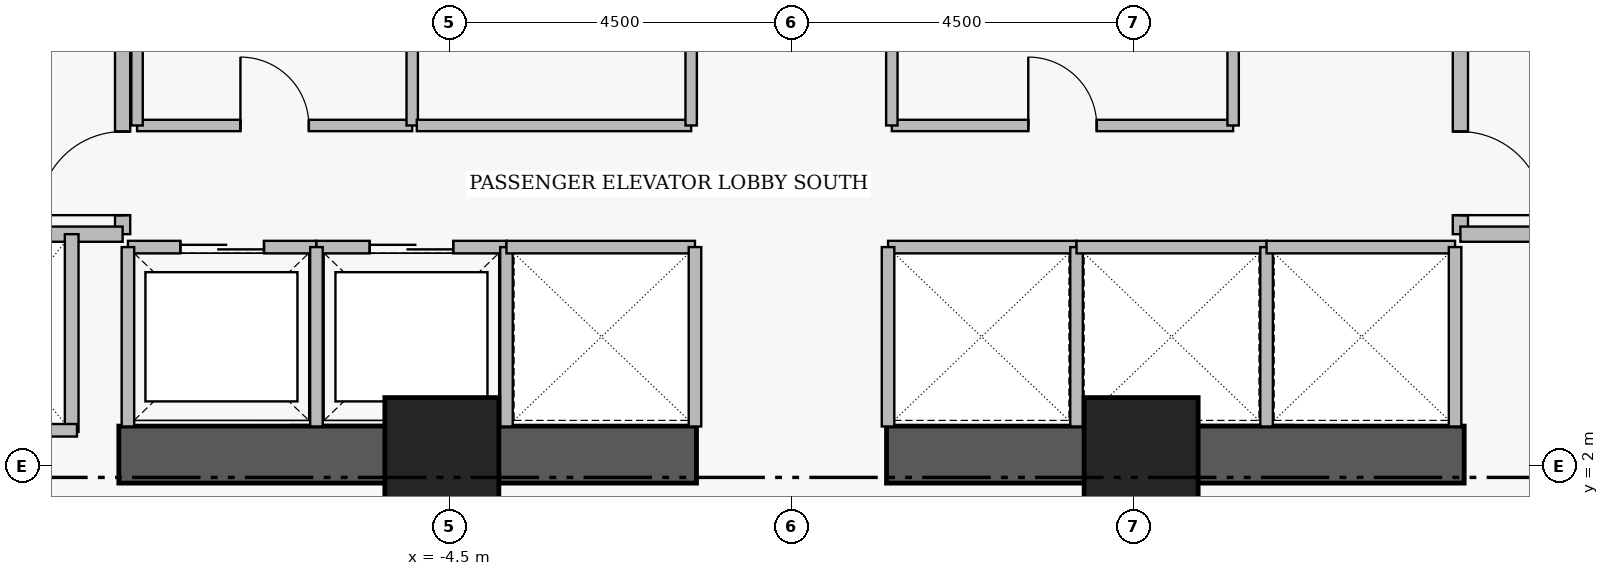
"""IFC4 building model, lengths in metres.
Left out: names, types, materials, properties, quantities, classifications, styles, units other than length and angle.
Written with IfcOpenShell. Run it as: python <this file> out.ifc"""

import sys

from ifc_helpers import new_model, si_unit, direction, frame, frame_2d, origin, origin_2d, place, context, subcontext, project, spatial, rectangle, extrude, element, fill, save


model = new_model("IFC4")
c1 = context("Model", 3, precision=1e-05, world=origin(), true_north=direction((0.0, 1.0)))
c2 = subcontext(c1, "Body", "Model", "MODEL_VIEW")
j1 = project(units=[si_unit("LENGTHUNIT", "METRE"), si_unit("PLANEANGLEUNIT", "RADIAN")], contexts=[c1])
p1 = place(None, origin())
s1 = spatial("IfcSite", under=j1, at=p1, CompositionType="ELEMENT")
p2 = place(p1, origin())
s2 = spatial("IfcBuilding", under=s1, at=p2, CompositionType="ELEMENT")
p3 = place(p2, frame((0.0, 0.0, 95.65)))
s3 = spatial("IfcBuildingStorey", under=s2, at=p3, CompositionType="ELEMENT", Elevation=95.65)
for number, where, z_axis, x_axis in (
    (1, (-8.85, 2.15, 0.0), (0.0, 0.0, 1.0), (1.0, 0.0, 0.0)),
    (2, (1.25, 2.15, 0.0), (0.0, 0.0, 1.0), (1.0, 0.0, 0.0)),
):
    element("IfcWall", number, at=place(p3, frame(where, z_axis=z_axis, x_axis=x_axis)), inside=s3, PredefinedType="SHEAR", context=c2, shape_type="SweptSolid", body=[
        extrude(rectangle(XDim=7.6, YDim=0.75, at=frame_2d((3.8, 0.0))), origin(), (0.0, 0.0, 1.0), 3.43),
    ])
for number, where, z_axis, x_axis in (
    (3, (-4.6, 2.15, 0.0), (0.0, 0.0, 1.0), (1.0, 0.0, 0.0)),
    (4, (4.6, 2.15, 0.0), (0.0, 0.0, 1.0), (1.0, 0.0, 0.0)),
):
    element("IfcColumn", number, at=place(p3, frame(where, z_axis=z_axis, x_axis=x_axis)), inside=s3, PredefinedType="COLUMN", context=c2, shape_type="SweptSolid", body=[
        extrude(rectangle(XDim=1.5, YDim=1.5, at=origin_2d()), origin(), (0.0, 0.0, 1.0), 3.65),
    ])
p4 = place(p3, frame((-8.8, 5.05, 0.0), z_axis=(0.0, 0.0, 1.0), x_axis=(0.0, 1.0, 0.0)))
e5 = element("IfcWall", 5, at=p4, inside=s3, PredefinedType="PARTITIONING", context=c2, shape_type="SweptSolid", body=[
    extrude(rectangle(XDim=6.1, YDim=0.2, at=frame_2d((3.05, 0.0))), origin(), (0.0, 0.0, 1.0), 3.43),
])
p5 = place(p4, frame((0.25, 0.0, 0.0)))
e6 = element("IfcOpeningElement", 6, at=p5, cuts=e5, PredefinedType="OPENING", context=c2, shape_type="SweptSolid", body=[
    extrude(rectangle(XDim=1.1, YDim=2.2, at=frame_2d((0.55, 1.1))), frame((0.0, 0.11, 0.0), z_axis=(0.0, -1.0, 0.0), x_axis=(1.0, 0.0, 0.0)), (0.0, 0.0, 1.0), 0.22),
])
p6 = place(p4, frame((3.85, 0.0, 0.0)))
e7 = element("IfcOpeningElement", 7, at=p6, cuts=e5, PredefinedType="OPENING", context=c2, shape_type="SweptSolid", body=[
    extrude(rectangle(XDim=1.1, YDim=2.2, at=frame_2d((0.55, 1.1))), frame((0.0, 0.11, 0.0), z_axis=(0.0, -1.0, 0.0), x_axis=(1.0, 0.0, 0.0)), (0.0, 0.0, 1.0), 0.22),
])
p7 = place(p3, frame((8.8, 11.15, 0.0), z_axis=(0.0, 0.0, 1.0), x_axis=(0.0, -1.0, 0.0)))
e8 = element("IfcWall", 8, at=p7, inside=s3, PredefinedType="PARTITIONING", context=c2, shape_type="SweptSolid", body=[
    extrude(rectangle(XDim=6.1, YDim=0.2, at=frame_2d((3.05, 0.0))), origin(), (0.0, 0.0, 1.0), 3.43),
])
p8 = place(p7, frame((1.15, 0.0, 0.0)))
e9 = element("IfcOpeningElement", 9, at=p8, cuts=e8, PredefinedType="OPENING", context=c2, shape_type="SweptSolid", body=[
    extrude(rectangle(XDim=1.1, YDim=2.2, at=frame_2d((0.55, 1.1))), frame((0.0, 0.11, 0.0), z_axis=(0.0, -1.0, 0.0), x_axis=(1.0, 0.0, 0.0)), (0.0, 0.0, 1.0), 0.22),
])
p9 = place(p7, frame((4.75, 0.0, 0.0)))
e10 = element("IfcOpeningElement", 10, at=p9, cuts=e8, PredefinedType="OPENING", context=c2, shape_type="SweptSolid", body=[
    extrude(rectangle(XDim=1.1, YDim=2.2, at=frame_2d((0.55, 1.1))), frame((0.0, 0.11, 0.0), z_axis=(0.0, -1.0, 0.0), x_axis=(1.0, 0.0, 0.0)), (0.0, 0.0, 1.0), 0.22),
])
p10 = place(p3, frame((-8.73, 4.88, 0.0), z_axis=(0.0, 0.0, 1.0), x_axis=(1.0, 0.0, 0.0)))
e11 = element("IfcWall", 11, at=p10, inside=s3, PredefinedType="PARTITIONING", context=c2, shape_type="SweptSolid", body=[
    extrude(rectangle(XDim=2.48, YDim=0.165, at=frame_2d((1.24, 0.0))), origin(), (0.0, 0.0, 1.0), 3.43),
])
p11 = place(p10, frame((0.69, 0.0, 0.0)))
e12 = element("IfcOpeningElement", 12, at=p11, cuts=e11, PredefinedType="OPENING", context=c2, shape_type="SweptSolid", body=[
    extrude(rectangle(XDim=1.1, YDim=2.25, at=frame_2d((0.55, 1.125))), frame((0.0, 0.093, 0.0), z_axis=(0.0, -1.0, 0.0), x_axis=(1.0, 0.0, 0.0)), (0.0, 0.0, 1.0), 0.185),
])
p12 = place(p3, frame((-6.25, 4.88, 0.0), z_axis=(0.0, 0.0, 1.0), x_axis=(1.0, 0.0, 0.0)))
e13 = element("IfcWall", 13, at=p12, inside=s3, PredefinedType="PARTITIONING", context=c2, shape_type="SweptSolid", body=[
    extrude(rectangle(XDim=2.5, YDim=0.165, at=frame_2d((1.25, 0.0))), origin(), (0.0, 0.0, 1.0), 3.43),
])
p13 = place(p12, frame((0.7, 0.0, 0.0)))
e14 = element("IfcOpeningElement", 14, at=p13, cuts=e13, PredefinedType="OPENING", context=c2, shape_type="SweptSolid", body=[
    extrude(rectangle(XDim=1.1, YDim=2.25, at=frame_2d((0.55, 1.125))), frame((0.0, 0.093, 0.0), z_axis=(0.0, -1.0, 0.0), x_axis=(1.0, 0.0, 0.0)), (0.0, 0.0, 1.0), 0.185),
])
p14 = place(p3, frame((-8.61, 6.48, 0.0), z_axis=(0.0, 0.0, 1.0), x_axis=(1.0, 0.0, 0.0)))
e15 = element("IfcWall", 15, at=p14, inside=s3, PredefinedType="PARTITIONING", context=c2, shape_type="SweptSolid", body=[
    extrude(rectangle(XDim=3.62, YDim=0.15, at=frame_2d((1.81, 0.0))), origin(), (0.0, 0.0, 1.0), 3.43),
])
p15 = place(p14, frame((1.36, 0.0, 0.0)))
e16 = element("IfcOpeningElement", 16, at=p15, cuts=e15, PredefinedType="OPENING", context=c2, shape_type="SweptSolid", body=[
    extrude(rectangle(XDim=0.9, YDim=2.15, at=frame_2d((0.45, 1.075))), frame((0.0, 0.085, 0.0), z_axis=(0.0, -1.0, 0.0), x_axis=(1.0, 0.0, 0.0)), (0.0, 0.0, 1.0), 0.17),
])
p16 = place(p3, frame((1.32, 6.48, 0.0), z_axis=(0.0, 0.0, 1.0), x_axis=(1.0, 0.0, 0.0)))
e17 = element("IfcWall", 17, at=p16, inside=s3, PredefinedType="PARTITIONING", context=c2, shape_type="SweptSolid", body=[
    extrude(rectangle(XDim=4.49, YDim=0.15, at=frame_2d((2.245, 0.0))), origin(), (0.0, 0.0, 1.0), 3.43),
])
p17 = place(p16, frame((1.795, 0.0, 0.0)))
e18 = element("IfcOpeningElement", 18, at=p17, cuts=e17, PredefinedType="OPENING", context=c2, shape_type="SweptSolid", body=[
    extrude(rectangle(XDim=0.9, YDim=2.15, at=frame_2d((0.45, 1.075))), frame((0.0, 0.085, 0.0), z_axis=(0.0, -1.0, 0.0), x_axis=(1.0, 0.0, 0.0)), (0.0, 0.0, 1.0), 0.17),
])
for number, where, z_axis, x_axis in (
    (19, (-11.65, 5.05, 0.0), (0.0, 0.0, 1.0), (1.0, 0.0, 0.0)),
    (20, (8.8, 5.05, 0.0), (0.0, 0.0, 1.0), (1.0, 0.0, 0.0)),
):
    element("IfcWall", number, at=place(p3, frame(where, z_axis=z_axis, x_axis=x_axis)), inside=s3, PredefinedType="PARTITIONING", context=c2, shape_type="SweptSolid", body=[
        extrude(rectangle(XDim=2.85, YDim=0.2, at=frame_2d((1.425, 0.0))), origin(), (0.0, 0.0, 1.0), 3.43),
    ])
for number, where, z_axis, x_axis in (
    (21, (-8.73, 2.52, 0.0), (0.0, 0.0, 1.0), (0.0, 1.0, 0.0)),
    (22, (-6.25, 2.52, 0.0), (0.0, 0.0, 1.0), (0.0, 1.0, 0.0)),
    (23, (-3.75, 2.52, 0.0), (0.0, 0.0, 1.0), (0.0, 1.0, 0.0)),
):
    element("IfcWall", number, at=place(p3, frame(where, z_axis=z_axis, x_axis=x_axis)), inside=s3, PredefinedType="PARTITIONING", context=c2, shape_type="SweptSolid", body=[
        extrude(rectangle(XDim=2.36, YDim=0.165, at=frame_2d((1.18, 0.0))), origin(), (0.0, 0.0, 1.0), 3.43),
    ])
p18 = place(p3, frame((-3.75, 4.88, 0.0), z_axis=(0.0, 0.0, 1.0), x_axis=(1.0, 0.0, 0.0)))
e24 = element("IfcWall", 24, at=p18, inside=s3, PredefinedType="PARTITIONING", context=c2, shape_type="SweptSolid", body=[
    extrude(rectangle(XDim=2.48, YDim=0.165, at=frame_2d((1.24, 0.0))), origin(), (0.0, 0.0, 1.0), 3.43),
])
p19 = place(p3, frame((-1.27, 2.52, 0.0), z_axis=(0.0, 0.0, 1.0), x_axis=(0.0, 1.0, 0.0)))
e25 = element("IfcWall", 25, at=p19, inside=s3, PredefinedType="PARTITIONING", context=c2, shape_type="SweptSolid", body=[
    extrude(rectangle(XDim=2.36, YDim=0.165, at=frame_2d((1.18, 0.0))), origin(), (0.0, 0.0, 1.0), 3.43),
])
p20 = place(p3, frame((1.27, 4.88, 0.0), z_axis=(0.0, 0.0, 1.0), x_axis=(1.0, 0.0, 0.0)))
e26 = element("IfcWall", 26, at=p20, inside=s3, PredefinedType="PARTITIONING", context=c2, shape_type="SweptSolid", body=[
    extrude(rectangle(XDim=2.48, YDim=0.165, at=frame_2d((1.24, 0.0))), origin(), (0.0, 0.0, 1.0), 3.43),
])
for number, where, z_axis, x_axis in (
    (27, (1.27, 2.52, 0.0), (0.0, 0.0, 1.0), (0.0, 1.0, 0.0)),
    (28, (3.75, 2.52, 0.0), (0.0, 0.0, 1.0), (0.0, 1.0, 0.0)),
):
    element("IfcWall", number, at=place(p3, frame(where, z_axis=z_axis, x_axis=x_axis)), inside=s3, PredefinedType="PARTITIONING", context=c2, shape_type="SweptSolid", body=[
        extrude(rectangle(XDim=2.36, YDim=0.165, at=frame_2d((1.18, 0.0))), origin(), (0.0, 0.0, 1.0), 3.43),
    ])
p21 = place(p3, frame((3.75, 4.88, 0.0), z_axis=(0.0, 0.0, 1.0), x_axis=(1.0, 0.0, 0.0)))
e29 = element("IfcWall", 29, at=p21, inside=s3, PredefinedType="PARTITIONING", context=c2, shape_type="SweptSolid", body=[
    extrude(rectangle(XDim=2.5, YDim=0.165, at=frame_2d((1.25, 0.0))), origin(), (0.0, 0.0, 1.0), 3.43),
])
p22 = place(p3, frame((6.25, 2.52, 0.0), z_axis=(0.0, 0.0, 1.0), x_axis=(0.0, 1.0, 0.0)))
e30 = element("IfcWall", 30, at=p22, inside=s3, PredefinedType="PARTITIONING", context=c2, shape_type="SweptSolid", body=[
    extrude(rectangle(XDim=2.36, YDim=0.165, at=frame_2d((1.18, 0.0))), origin(), (0.0, 0.0, 1.0), 3.43),
])
p23 = place(p3, frame((6.25, 4.88, 0.0), z_axis=(0.0, 0.0, 1.0), x_axis=(1.0, 0.0, 0.0)))
e31 = element("IfcWall", 31, at=p23, inside=s3, PredefinedType="PARTITIONING", context=c2, shape_type="SweptSolid", body=[
    extrude(rectangle(XDim=2.48, YDim=0.165, at=frame_2d((1.24, 0.0))), origin(), (0.0, 0.0, 1.0), 3.43),
])
p24 = place(p3, frame((8.73, 2.52, 0.0), z_axis=(0.0, 0.0, 1.0), x_axis=(0.0, 1.0, 0.0)))
e32 = element("IfcWall", 32, at=p24, inside=s3, PredefinedType="PARTITIONING", context=c2, shape_type="SweptSolid", body=[
    extrude(rectangle(XDim=2.36, YDim=0.165, at=frame_2d((1.18, 0.0))), origin(), (0.0, 0.0, 1.0), 3.43),
])
p25 = place(p3, frame((-9.47, 2.45, 0.0), z_axis=(0.0, 0.0, 1.0), x_axis=(0.0, 1.0, 0.0)))
e33 = element("IfcWall", 33, at=p25, inside=s3, PredefinedType="PARTITIONING", context=c2, shape_type="SweptSolid", body=[
    extrude(rectangle(XDim=2.6, YDim=0.18, at=frame_2d((1.3, 0.0))), origin(), (0.0, 0.0, 1.0), 3.43),
])
p26 = place(p3, frame((-11.71, 2.47, 0.0), z_axis=(0.0, 0.0, 1.0), x_axis=(1.0, 0.0, 0.0)))
e34 = element("IfcWall", 34, at=p26, inside=s3, PredefinedType="PARTITIONING", context=c2, shape_type="SweptSolid", body=[
    extrude(rectangle(XDim=2.31, YDim=0.165, at=frame_2d((1.155, 0.0))), origin(), (0.0, 0.0, 1.0), 2.03),
])
for number, where, z_axis, x_axis in (
    (35, (-8.61, 6.48, 0.0), (0.0, 0.0, 1.0), (0.0, 1.0, 0.0)),
    (36, (-4.99, 6.48, 0.0), (0.0, 0.0, 1.0), (0.0, 1.0, 0.0)),
):
    element("IfcWall", number, at=place(p3, frame(where, z_axis=z_axis, x_axis=x_axis)), inside=s3, PredefinedType="PARTITIONING", context=c2, shape_type="SweptSolid", body=[
        extrude(rectangle(XDim=2.24, YDim=0.15, at=frame_2d((1.12, 0.0))), origin(), (0.0, 0.0, 1.0), 3.43),
    ])
p27 = place(p3, frame((-4.93, 6.48, 0.0), z_axis=(0.0, 0.0, 1.0), x_axis=(1.0, 0.0, 0.0)))
e37 = element("IfcWall", 37, at=p27, inside=s3, PredefinedType="PARTITIONING", context=c2, shape_type="SweptSolid", body=[
    extrude(rectangle(XDim=3.61, YDim=0.15, at=frame_2d((1.805, 0.0))), origin(), (0.0, 0.0, 1.0), 3.43),
])
for number, where, z_axis, x_axis in (
    (38, (-1.32, 6.48, 0.0), (0.0, 0.0, 1.0), (0.0, 1.0, 0.0)),
    (39, (1.32, 6.48, 0.0), (0.0, 0.0, 1.0), (0.0, 1.0, 0.0)),
    (40, (5.81, 6.48, 0.0), (0.0, 0.0, 1.0), (0.0, 1.0, 0.0)),
):
    element("IfcWall", number, at=place(p3, frame(where, z_axis=z_axis, x_axis=x_axis)), inside=s3, PredefinedType="PARTITIONING", context=c2, shape_type="SweptSolid", body=[
        extrude(rectangle(XDim=2.24, YDim=0.15, at=frame_2d((1.12, 0.0))), origin(), (0.0, 0.0, 1.0), 3.43),
    ])
p28 = place(p5, origin())
e41 = element("IfcDoor", 41, at=p28, inside=s3, OperationType="SINGLE_SWING_LEFT", PredefinedType="DOOR", context=c2, shape_type="SweptSolid", body=[
    extrude(rectangle(XDim=1.1, YDim=2.2, at=frame_2d((0.55, 1.1))), frame((0.0, 0.025, 0.0), z_axis=(0.0, -1.0, 0.0), x_axis=(1.0, 0.0, 0.0)), (0.0, 0.0, 1.0), 0.05),
])
fill(e6, e41)
p29 = place(p9, origin())
e42 = element("IfcDoor", 42, at=p29, inside=s3, OperationType="SINGLE_SWING_RIGHT", PredefinedType="DOOR", context=c2, shape_type="SweptSolid", body=[
    extrude(rectangle(XDim=1.1, YDim=2.2, at=frame_2d((0.55, 1.1))), frame((0.0, 0.025, 0.0), z_axis=(0.0, -1.0, 0.0), x_axis=(1.0, 0.0, 0.0)), (0.0, 0.0, 1.0), 0.05),
])
fill(e10, e42)
p30 = place(p11, origin())
e43 = element("IfcDoor", 43, at=p30, inside=s3, OperationType="SLIDING_TO_LEFT", PredefinedType="DOOR", context=c2, shape_type="SweptSolid", body=[
    extrude(rectangle(XDim=1.1, YDim=2.25, at=frame_2d((0.55, 1.125))), frame((0.0, 0.025, 0.0), z_axis=(0.0, -1.0, 0.0), x_axis=(1.0, 0.0, 0.0)), (0.0, 0.0, 1.0), 0.05),
])
fill(e12, e43)
p31 = place(p13, origin())
e44 = element("IfcDoor", 44, at=p31, inside=s3, OperationType="SLIDING_TO_LEFT", PredefinedType="DOOR", context=c2, shape_type="SweptSolid", body=[
    extrude(rectangle(XDim=1.1, YDim=2.25, at=frame_2d((0.55, 1.125))), frame((0.0, 0.025, 0.0), z_axis=(0.0, -1.0, 0.0), x_axis=(1.0, 0.0, 0.0)), (0.0, 0.0, 1.0), 0.05),
])
fill(e14, e44)
p32 = place(p15, origin())
e45 = element("IfcDoor", 45, at=p32, inside=s3, OperationType="SINGLE_SWING_LEFT", PredefinedType="DOOR", context=c2, shape_type="SweptSolid", body=[
    extrude(rectangle(XDim=0.9, YDim=2.15, at=frame_2d((0.45, 1.075))), frame((0.0, 0.025, 0.0), z_axis=(0.0, -1.0, 0.0), x_axis=(1.0, 0.0, 0.0)), (0.0, 0.0, 1.0), 0.05),
])
fill(e16, e45)
p33 = place(p17, origin())
e46 = element("IfcDoor", 46, at=p33, inside=s3, OperationType="SINGLE_SWING_LEFT", PredefinedType="DOOR", context=c2, shape_type="SweptSolid", body=[
    extrude(rectangle(XDim=0.9, YDim=2.15, at=frame_2d((0.45, 1.075))), frame((0.0, 0.025, 0.0), z_axis=(0.0, -1.0, 0.0), x_axis=(1.0, 0.0, 0.0)), (0.0, 0.0, 1.0), 0.05),
])
fill(e18, e46)
save(model, sys.argv[1])
